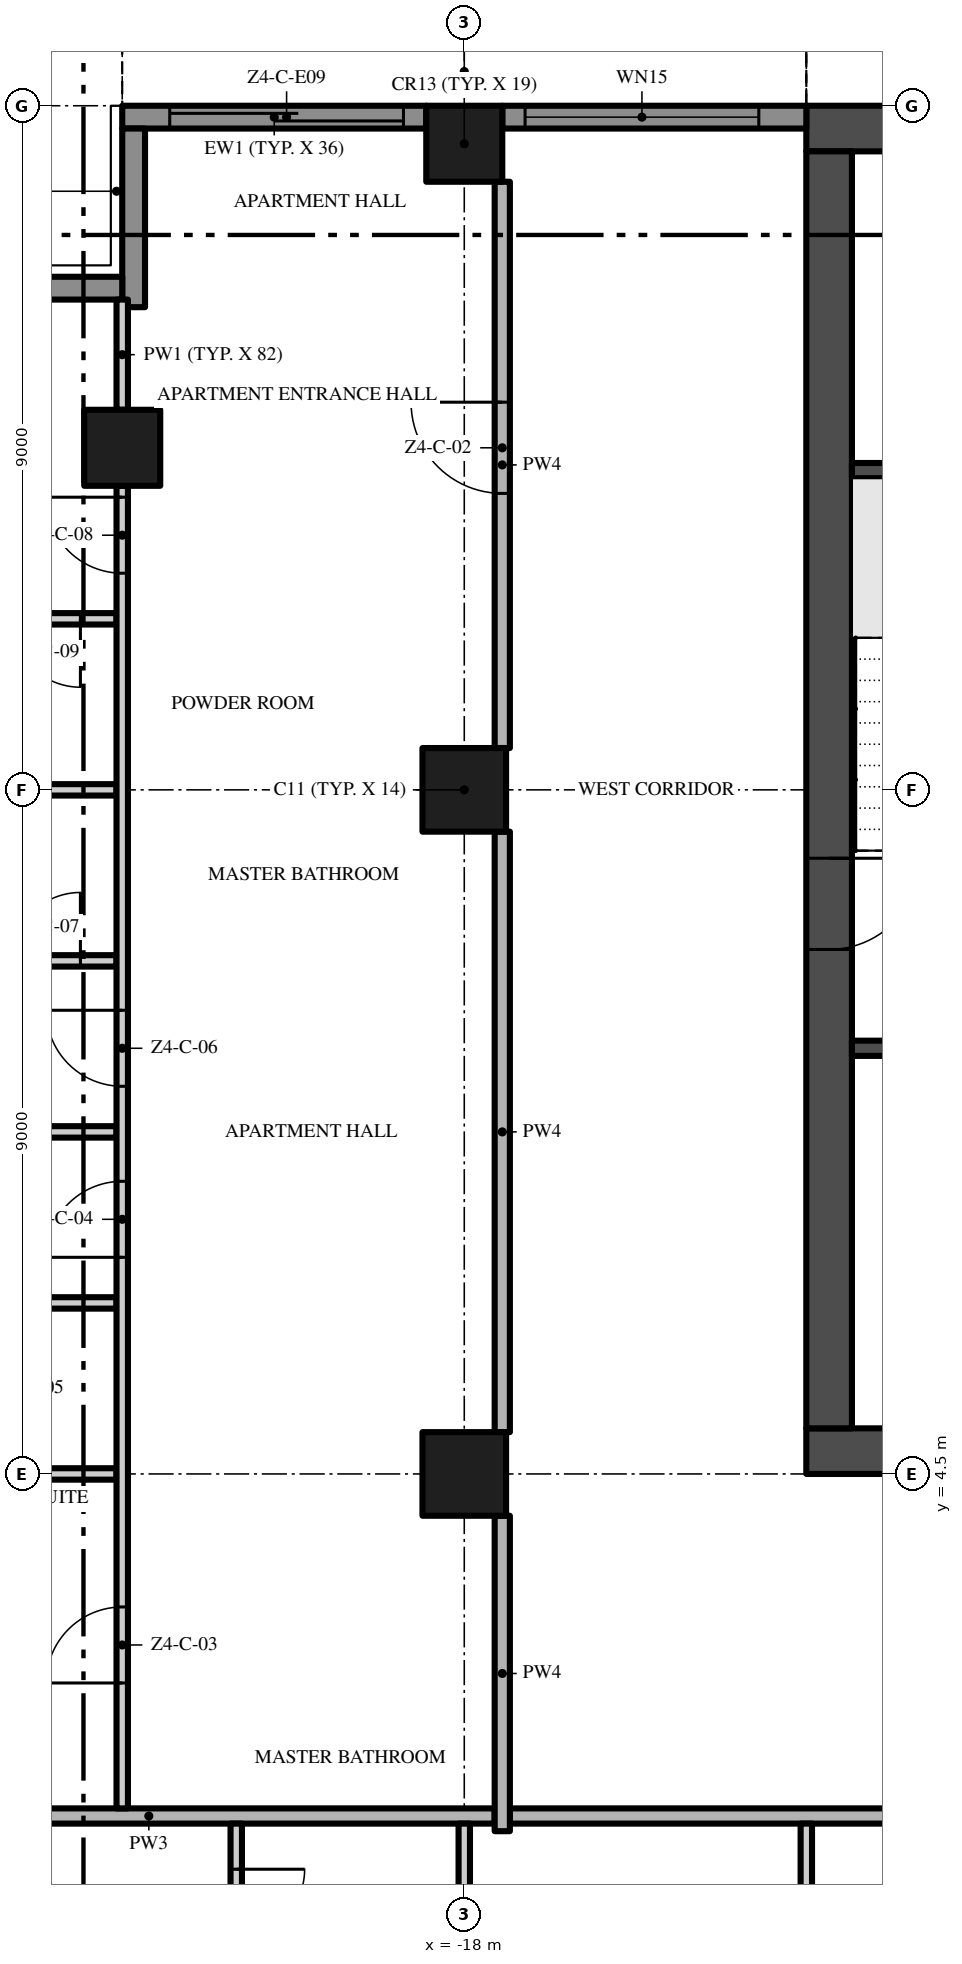
"""IFC4 building model, lengths in metres.
Left out: names, types, materials, properties, quantities, classifications, styles, units other than length and angle.
Written with IfcOpenShell. Run it as: python <this file> out.ifc"""

import sys

from ifc_helpers import new_model, si_unit, direction, frame, frame_2d, origin, origin_2d, place, context, subcontext, project, spatial, rectangle, extrude, element, fill, save


model = new_model("IFC4")
c1 = context("Model", 3, precision=1e-05, world=origin(), true_north=direction((0.0, 1.0)))
c2 = subcontext(c1, "Body", "Model", "MODEL_VIEW")
j1 = project(units=[si_unit("LENGTHUNIT", "METRE"), si_unit("PLANEANGLEUNIT", "RADIAN")], contexts=[c1])
p1 = place(None, origin())
s1 = spatial("IfcSite", under=j1, at=p1, CompositionType="ELEMENT")
p2 = place(p1, origin())
s2 = spatial("IfcBuilding", under=s1, at=p2, CompositionType="ELEMENT")
p3 = place(p2, frame((0.0, 0.0, 207.2)))
s3 = spatial("IfcBuildingStorey", under=s2, at=p3, CompositionType="ELEMENT", Elevation=207.2)
p4 = place(p3, frame((-13.5, 4.8, -0.3), z_axis=(0.0, 0.0, 1.0), x_axis=(1.0, 0.0, 0.0)))
e1 = element("IfcWall", 1, at=p4, inside=s3, PredefinedType="SHEAR", context=c2, shape_type="SweptSolid", body=[
    extrude(rectangle(XDim=27.0, YDim=0.6, at=frame_2d((13.5, 0.0))), origin(), (0.0, 0.0, 1.0), 3.8),
])
p5 = place(p4, frame((12.0, 0.0, 0.3)))
e2 = element("IfcOpeningElement", 2, at=p5, cuts=e1, PredefinedType="OPENING", context=c2, shape_type="SweptSolid", body=[
    extrude(rectangle(XDim=3.0, YDim=2.4, at=frame_2d((1.5, 1.2))), frame((0.0, 0.31, 0.0), z_axis=(0.0, -1.0, 0.0), x_axis=(1.0, 0.0, 0.0)), (0.0, 0.0, 1.0), 0.62),
])
p6 = place(p4, frame((4.9, 0.0, 0.3)))
e3 = element("IfcOpeningElement", 3, at=p6, cuts=e1, PredefinedType="OPENING", context=c2, shape_type="SweptSolid", body=[
    extrude(rectangle(XDim=1.2, YDim=2.2, at=frame_2d((0.6, 1.1))), frame((0.0, 0.31, 0.0), z_axis=(0.0, -1.0, 0.0), x_axis=(1.0, 0.0, 0.0)), (0.0, 0.0, 1.0), 0.62),
])
p7 = place(p4, frame((20.75, 0.0, 0.3)))
e4 = element("IfcOpeningElement", 4, at=p7, cuts=e1, PredefinedType="OPENING", context=c2, shape_type="SweptSolid", body=[
    extrude(rectangle(XDim=1.5, YDim=2.2, at=frame_2d((0.75, 1.1))), frame((0.0, 0.31, 0.0), z_axis=(0.0, -1.0, 0.0), x_axis=(1.0, 0.0, 0.0)), (0.0, 0.0, 1.0), 0.62),
])
p8 = place(p4, frame((17.4, 0.0, 0.3)))
e5 = element("IfcOpeningElement", 5, at=p8, cuts=e1, PredefinedType="OPENING", context=c2, shape_type="SweptSolid", body=[
    extrude(rectangle(XDim=1.2, YDim=2.2, at=frame_2d((0.6, 1.1))), frame((0.0, 0.31, 0.0), z_axis=(0.0, -1.0, 0.0), x_axis=(1.0, 0.0, 0.0)), (0.0, 0.0, 1.0), 0.62),
])
p9 = place(p3, frame((13.5, 22.2, -0.3), z_axis=(0.0, 0.0, 1.0), x_axis=(-1.0, 0.0, 0.0)))
e6 = element("IfcWall", 6, at=p9, inside=s3, PredefinedType="SHEAR", context=c2, shape_type="SweptSolid", body=[
    extrude(rectangle(XDim=27.0, YDim=0.6, at=frame_2d((13.5, 0.0))), origin(), (0.0, 0.0, 1.0), 3.8),
])
p10 = place(p3, frame((-13.2, 21.9, -0.3), z_axis=(0.0, 0.0, 1.0), x_axis=(0.0, -1.0, 0.0)))
e7 = element("IfcWall", 7, at=p10, inside=s3, PredefinedType="SHEAR", context=c2, shape_type="SweptSolid", body=[
    extrude(rectangle(XDim=16.8, YDim=0.6, at=frame_2d((8.4, 0.0))), origin(), (0.0, 0.0, 1.0), 3.8),
])
p11 = place(p10, frame((9.3, 0.0, 0.3)))
e8 = element("IfcOpeningElement", 8, at=p11, cuts=e7, PredefinedType="OPENING", context=c2, shape_type="SweptSolid", body=[
    extrude(rectangle(XDim=1.2, YDim=2.2, at=frame_2d((0.6, 1.1))), frame((0.0, 0.31, 0.0), z_axis=(0.0, -1.0, 0.0), x_axis=(1.0, 0.0, 0.0)), (0.0, 0.0, 1.0), 0.62),
])
p12 = place(p3, frame((-18.0, 13.5, 0.0), z_axis=(0.0, 0.0, 1.0), x_axis=(1.0, 0.0, 0.0)))
e9 = element("IfcColumn", 9, at=p12, inside=s3, PredefinedType="COLUMN", context=c2, shape_type="SweptSolid", body=[
    extrude(rectangle(XDim=1.1, YDim=1.1, at=origin_2d()), origin(), (0.0, 0.0, 1.0), 3.5),
])
p13 = place(p3, frame((-18.0, 22.0, 0.0), z_axis=(0.0, 0.0, 1.0), x_axis=(1.0, 0.0, 0.0)))
e10 = element("IfcColumn", 10, at=p13, inside=s3, PredefinedType="COLUMN", context=c2, shape_type="SweptSolid", body=[
    extrude(rectangle(XDim=1.0, YDim=1.0, at=origin_2d()), origin(), (0.0, 0.0, 1.0), 3.5),
])
p14 = place(p3, frame((-18.0, 4.5, 0.0), z_axis=(0.0, 0.0, 1.0), x_axis=(1.0, 0.0, 0.0)))
e11 = element("IfcColumn", 11, at=p14, inside=s3, PredefinedType="COLUMN", context=c2, shape_type="SweptSolid", body=[
    extrude(rectangle(XDim=1.1, YDim=1.1, at=origin_2d()), origin(), (0.0, 0.0, 1.0), 3.5),
])
p15 = place(p3, frame((-22.5, 18.0, 0.0), z_axis=(0.0, 0.0, 1.0), x_axis=(1.0, 0.0, 0.0)))
e12 = element("IfcColumn", 12, at=p15, inside=s3, PredefinedType="COLUMN", context=c2, shape_type="SweptSolid", body=[
    extrude(rectangle(XDim=1.0, YDim=1.0, at=origin_2d()), origin(), (0.0, 0.0, 1.0), 3.5),
])
p16 = place(p3, frame((-17.5, 22.35, 0.0), z_axis=(0.0, 0.0, 1.0), x_axis=(1.0, 0.0, 0.0)))
e13 = element("IfcWall", 13, at=p16, inside=s3, PredefinedType="SOLIDWALL", context=c2, shape_type="SweptSolid", body=[
    extrude(rectangle(XDim=4.0, YDim=0.3, at=frame_2d((2.0, 0.0))), origin(), (0.0, 0.0, 1.0), 3.5),
])
p17 = place(p16, frame((0.3, 0.0, 0.45)))
e14 = element("IfcOpeningElement", 14, at=p17, cuts=e13, PredefinedType="OPENING", context=c2, shape_type="SweptSolid", body=[
    extrude(rectangle(XDim=3.075, YDim=2.65, at=frame_2d((1.538, 1.325))), frame((0.0, 0.16, 0.0), z_axis=(0.0, -1.0, 0.0), x_axis=(1.0, 0.0, 0.0)), (0.0, 0.0, 1.0), 0.32),
])
p18 = place(p3, frame((-22.5, 22.35, 0.0), z_axis=(0.0, 0.0, 1.0), x_axis=(1.0, 0.0, 0.0)))
e15 = element("IfcWall", 15, at=p18, inside=s3, PredefinedType="SOLIDWALL", context=c2, shape_type="SweptSolid", body=[
    extrude(rectangle(XDim=4.0, YDim=0.3, at=frame_2d((2.0, 0.0))), origin(), (0.0, 0.0, 1.0), 3.5),
])
p19 = place(p18, frame((0.625, 0.0, 0.0)))
e16 = element("IfcOpeningElement", 16, at=p19, cuts=e15, PredefinedType="OPENING", context=c2, shape_type="SweptSolid", body=[
    extrude(rectangle(XDim=3.075, YDim=2.4, at=frame_2d((1.538, 1.2))), frame((0.0, 0.16, 0.0), z_axis=(0.0, -1.0, 0.0), x_axis=(1.0, 0.0, 0.0)), (0.0, 0.0, 1.0), 0.32),
])
p20 = place(p3, frame((-22.35, 19.85, 0.0), z_axis=(0.0, 0.0, 1.0), x_axis=(0.0, 1.0, 0.0)))
e17 = element("IfcWall", 17, at=p20, inside=s3, PredefinedType="SOLIDWALL", context=c2, shape_type="SweptSolid", body=[
    extrude(rectangle(XDim=2.35, YDim=0.3, at=frame_2d((1.175, 0.0))), origin(), (0.0, 0.0, 1.0), 3.5),
])
p21 = place(p3, frame((-24.75, 20.1, 0.0), z_axis=(0.0, 0.0, 1.0), x_axis=(1.0, 0.0, 0.0)))
e18 = element("IfcWall", 18, at=p21, inside=s3, PredefinedType="SOLIDWALL", context=c2, shape_type="SweptSolid", body=[
    extrude(rectangle(XDim=2.25, YDim=0.3, at=frame_2d((1.125, 0.0))), origin(), (0.0, 0.0, 1.0), 3.5),
])
for number, where, z_axis, x_axis in (
    (19, (-12.9, 10.1, 0.0), (0.0, 0.0, 1.0), (1.0, 0.0, 0.0)),
    (20, (-12.9, 17.7, 0.0), (0.0, 0.0, 1.0), (1.0, 0.0, 0.0)),
):
    element("IfcWall", number, at=place(p3, frame(where, z_axis=z_axis, x_axis=x_axis)), inside=s3, PredefinedType="SHEAR", context=c2, shape_type="SweptSolid", body=[
        extrude(rectangle(XDim=3.25, YDim=0.2, at=frame_2d((1.625, 0.0))), origin(), (0.0, 0.0, 1.0), 3.5),
    ])
p22 = place(p3, frame((-17.4, 0.0, 0.0), z_axis=(0.0, 0.0, 1.0), x_axis=(1.0, 0.0, 0.0)))
e21 = element("IfcWall", 21, at=p22, inside=s3, PredefinedType="PARTITIONING", context=c2, shape_type="SweptSolid", body=[
    extrude(rectangle(XDim=12.8, YDim=0.2, at=frame_2d((6.4, 0.0))), origin(), (0.0, 0.0, 1.0), 3.5),
])
p23 = place(p3, frame((-26.7, 0.0, 0.0), z_axis=(0.0, 0.0, 1.0), x_axis=(1.0, 0.0, 0.0)))
e22 = element("IfcWall", 22, at=p23, inside=s3, PredefinedType="PARTITIONING", context=c2, shape_type="SweptSolid", body=[
    extrude(rectangle(XDim=9.1, YDim=0.2, at=frame_2d((4.55, 0.0))), origin(), (0.0, 0.0, 1.0), 3.5),
])
p24 = place(p3, frame((-26.0, 4.5, 0.0), z_axis=(0.0, 0.0, 1.0), x_axis=(1.0, 0.0, 0.0)))
e23 = element("IfcWall", 23, at=p24, inside=s3, PredefinedType="PARTITIONING", context=c2, shape_type="SweptSolid", body=[
    extrude(rectangle(XDim=3.425, YDim=0.15, at=frame_2d((1.712, 0.0))), origin(), (0.0, 0.0, 1.0), 3.5),
])
p25 = place(p3, frame((-24.45, 6.75, 0.0), z_axis=(0.0, 0.0, 1.0), x_axis=(1.0, 0.0, 0.0)))
e24 = element("IfcWall", 24, at=p25, inside=s3, PredefinedType="PARTITIONING", context=c2, shape_type="SweptSolid", body=[
    extrude(rectangle(XDim=1.875, YDim=0.15, at=frame_2d((0.938, 0.0))), origin(), (0.0, 0.0, 1.0), 3.5),
])
p26 = place(p3, frame((-26.7, 9.0, 0.0), z_axis=(0.0, 0.0, 1.0), x_axis=(1.0, 0.0, 0.0)))
e25 = element("IfcWall", 25, at=p26, inside=s3, PredefinedType="PARTITIONING", context=c2, shape_type="SweptSolid", body=[
    extrude(rectangle(XDim=4.125, YDim=0.15, at=frame_2d((2.062, 0.0))), origin(), (0.0, 0.0, 1.0), 3.5),
])
p27 = place(p3, frame((-24.45, 11.25, 0.0), z_axis=(0.0, 0.0, 1.0), x_axis=(1.0, 0.0, 0.0)))
e26 = element("IfcWall", 26, at=p27, inside=s3, PredefinedType="PARTITIONING", context=c2, shape_type="SweptSolid", body=[
    extrude(rectangle(XDim=1.875, YDim=0.15, at=frame_2d((0.938, 0.0))), origin(), (0.0, 0.0, 1.0), 3.5),
])
p28 = place(p27, frame((0.5, 0.0, 0.0)))
e27 = element("IfcOpeningElement", 27, at=p28, cuts=e26, PredefinedType="OPENING", context=c2, shape_type="SweptSolid", body=[
    extrude(rectangle(XDim=0.9, YDim=2.1, at=frame_2d((0.45, 1.05))), frame((0.0, 0.085, 0.0), z_axis=(0.0, -1.0, 0.0), x_axis=(1.0, 0.0, 0.0)), (0.0, 0.0, 1.0), 0.17),
])
p29 = place(p3, frame((-24.45, 13.5, 0.0), z_axis=(0.0, 0.0, 1.0), x_axis=(1.0, 0.0, 0.0)))
e28 = element("IfcWall", 28, at=p29, inside=s3, PredefinedType="PARTITIONING", context=c2, shape_type="SweptSolid", body=[
    extrude(rectangle(XDim=1.875, YDim=0.15, at=frame_2d((0.938, 0.0))), origin(), (0.0, 0.0, 1.0), 3.5),
])
p30 = place(p3, frame((-22.575, 15.75, 0.0), z_axis=(0.0, 0.0, 1.0), x_axis=(-1.0, 0.0, 0.0)))
e29 = element("IfcWall", 29, at=p30, inside=s3, PredefinedType="PARTITIONING", context=c2, shape_type="SweptSolid", body=[
    extrude(rectangle(XDim=1.875, YDim=0.15, at=frame_2d((0.938, 0.0))), origin(), (0.0, 0.0, 1.0), 3.5),
])
p31 = place(p30, frame((0.475, 0.0, 0.0)))
e30 = element("IfcOpeningElement", 30, at=p31, cuts=e29, PredefinedType="OPENING", context=c2, shape_type="SweptSolid", body=[
    extrude(rectangle(XDim=0.9, YDim=2.1, at=frame_2d((0.45, 1.05))), frame((0.0, 0.085, 0.0), z_axis=(0.0, -1.0, 0.0), x_axis=(1.0, 0.0, 0.0)), (0.0, 0.0, 1.0), 0.17),
])
p32 = place(p3, frame((-22.5, 0.1, 0.0), z_axis=(0.0, 0.0, 1.0), x_axis=(0.0, 1.0, 0.0)))
e31 = element("IfcWall", 31, at=p32, inside=s3, PredefinedType="PARTITIONING", context=c2, shape_type="SweptSolid", body=[
    extrude(rectangle(XDim=17.4, YDim=0.15, at=frame_2d((8.7, 0.0))), origin(), (0.0, 0.0, 1.0), 3.5),
])
p33 = place(p32, frame((1.65, 0.0, 0.0)))
e32 = element("IfcOpeningElement", 32, at=p33, cuts=e31, PredefinedType="OPENING", context=c2, shape_type="SweptSolid", body=[
    extrude(rectangle(XDim=1.0, YDim=2.4, at=frame_2d((0.5, 1.2))), frame((0.0, 0.085, 0.0), z_axis=(0.0, -1.0, 0.0), x_axis=(1.0, 0.0, 0.0)), (0.0, 0.0, 1.0), 0.17),
])
p34 = place(p32, frame((7.25, 0.0, 0.0)))
e33 = element("IfcOpeningElement", 33, at=p34, cuts=e31, PredefinedType="OPENING", context=c2, shape_type="SweptSolid", body=[
    extrude(rectangle(XDim=1.0, YDim=2.4, at=frame_2d((0.5, 1.2))), frame((0.0, 0.085, 0.0), z_axis=(0.0, -1.0, 0.0), x_axis=(1.0, 0.0, 0.0)), (0.0, 0.0, 1.0), 0.17),
])
p35 = place(p32, frame((9.5, 0.0, 0.0)))
e34 = element("IfcOpeningElement", 34, at=p35, cuts=e31, PredefinedType="OPENING", context=c2, shape_type="SweptSolid", body=[
    extrude(rectangle(XDim=1.0, YDim=2.4, at=frame_2d((0.5, 1.2))), frame((0.0, 0.085, 0.0), z_axis=(0.0, -1.0, 0.0), x_axis=(1.0, 0.0, 0.0)), (0.0, 0.0, 1.0), 0.17),
])
p36 = place(p32, frame((16.25, 0.0, 0.0)))
e35 = element("IfcOpeningElement", 35, at=p36, cuts=e31, PredefinedType="OPENING", context=c2, shape_type="SweptSolid", body=[
    extrude(rectangle(XDim=1.0, YDim=2.4, at=frame_2d((0.5, 1.2))), frame((0.0, 0.085, 0.0), z_axis=(0.0, -1.0, 0.0), x_axis=(1.0, 0.0, 0.0)), (0.0, 0.0, 1.0), 0.17),
])
p37 = place(p3, frame((-22.5, 18.5, 0.0), z_axis=(0.0, 0.0, 1.0), x_axis=(0.0, 1.0, 0.0)))
e36 = element("IfcWall", 36, at=p37, inside=s3, PredefinedType="PARTITIONING", context=c2, shape_type="SweptSolid", body=[
    extrude(rectangle(XDim=1.45, YDim=0.15, at=frame_2d((0.725, 0.0))), origin(), (0.0, 0.0, 1.0), 3.5),
])
p38 = place(p3, frame((-21.0, -0.1, 0.0), z_axis=(0.0, 0.0, 1.0), x_axis=(0.0, -1.0, 0.0)))
e37 = element("IfcWall", 37, at=p38, inside=s3, PredefinedType="PARTITIONING", context=c2, shape_type="SweptSolid", body=[
    extrude(rectangle(XDim=2.225, YDim=0.15, at=frame_2d((1.113, 0.0))), origin(), (0.0, 0.0, 1.0), 3.5),
])
p39 = place(p38, frame((0.6, 0.0, 0.0)))
e38 = element("IfcOpeningElement", 38, at=p39, cuts=e37, PredefinedType="OPENING", context=c2, shape_type="SweptSolid", body=[
    extrude(rectangle(XDim=0.9, YDim=2.1, at=frame_2d((0.45, 1.05))), frame((0.0, 0.085, 0.0), z_axis=(0.0, -1.0, 0.0), x_axis=(1.0, 0.0, 0.0)), (0.0, 0.0, 1.0), 0.17),
])
p40 = place(p3, frame((-18.0, -3.95, 0.0), z_axis=(0.0, 0.0, 1.0), x_axis=(0.0, 1.0, 0.0)))
e39 = element("IfcWall", 39, at=p40, inside=s3, PredefinedType="PARTITIONING", context=c2, shape_type="SweptSolid", body=[
    extrude(rectangle(XDim=3.85, YDim=0.15, at=frame_2d((1.925, 0.0))), origin(), (0.0, 0.0, 1.0), 3.5),
])
p41 = place(p40, frame((0.15, 0.0, 0.0)))
e40 = element("IfcOpeningElement", 40, at=p41, cuts=e39, PredefinedType="OPENING", context=c2, shape_type="SweptSolid", body=[
    extrude(rectangle(XDim=1.0, YDim=2.4, at=frame_2d((0.5, 1.2))), frame((0.0, 0.085, 0.0), z_axis=(0.0, -1.0, 0.0), x_axis=(1.0, 0.0, 0.0)), (0.0, 0.0, 1.0), 0.17),
])
p42 = place(p3, frame((-17.5, -0.2, 0.0), z_axis=(0.0, 0.0, 1.0), x_axis=(0.0, 1.0, 0.0)))
e41 = element("IfcWall", 41, at=p42, inside=s3, PredefinedType="PARTITIONING", context=c2, shape_type="SweptSolid", body=[
    extrude(rectangle(XDim=4.15, YDim=0.2, at=frame_2d((2.075, 0.0))), origin(), (0.0, 0.0, 1.0), 3.5),
])
p43 = place(p3, frame((-17.5, 5.05, 0.0), z_axis=(0.0, 0.0, 1.0), x_axis=(0.0, 1.0, 0.0)))
e42 = element("IfcWall", 42, at=p43, inside=s3, PredefinedType="PARTITIONING", context=c2, shape_type="SweptSolid", body=[
    extrude(rectangle(XDim=7.9, YDim=0.2, at=frame_2d((3.95, 0.0))), origin(), (0.0, 0.0, 1.0), 3.5),
])
p44 = place(p3, frame((-17.5, 14.05, 0.0), z_axis=(0.0, 0.0, 1.0), x_axis=(0.0, 1.0, 0.0)))
e43 = element("IfcWall", 43, at=p44, inside=s3, PredefinedType="PARTITIONING", context=c2, shape_type="SweptSolid", body=[
    extrude(rectangle(XDim=7.45, YDim=0.2, at=frame_2d((3.725, 0.0))), origin(), (0.0, 0.0, 1.0), 3.5),
])
p45 = place(p44, frame((3.35, 0.0, 0.0)))
e44 = element("IfcOpeningElement", 44, at=p45, cuts=e43, PredefinedType="OPENING", context=c2, shape_type="SweptSolid", body=[
    extrude(rectangle(XDim=1.2, YDim=2.4, at=frame_2d((0.6, 1.2))), frame((0.0, 0.11, 0.0), z_axis=(0.0, -1.0, 0.0), x_axis=(1.0, 0.0, 0.0)), (0.0, 0.0, 1.0), 0.22),
])
p46 = place(p3, frame((-13.5, -8.325, 0.0), z_axis=(0.0, 0.0, 1.0), x_axis=(0.0, 1.0, 0.0)))
e45 = element("IfcWall", 45, at=p46, inside=s3, PredefinedType="PARTITIONING", context=c2, shape_type="SweptSolid", body=[
    extrude(rectangle(XDim=8.225, YDim=0.15, at=frame_2d((4.112, 0.0))), origin(), (0.0, 0.0, 1.0), 3.5),
])
p47 = place(p17, origin())
e46 = element("IfcWindow", 46, at=p47, inside=s3, PartitioningType="SINGLE_PANEL", PredefinedType="WINDOW", context=c2, shape_type="SweptSolid", body=[
    extrude(rectangle(XDim=3.075, YDim=2.65, at=frame_2d((1.538, 1.325))), frame((0.0, 0.03, 0.0), z_axis=(0.0, -1.0, 0.0), x_axis=(1.0, 0.0, 0.0)), (0.0, 0.0, 1.0), 0.06),
])
fill(e14, e46)
p48 = place(p19, origin())
e47 = element("IfcDoor", 47, at=p48, inside=s3, OperationType="SINGLE_SWING_LEFT", PredefinedType="DOOR", context=c2, shape_type="SweptSolid", body=[
    extrude(rectangle(XDim=3.075, YDim=2.4, at=frame_2d((1.538, 1.2))), frame((0.0, 0.025, 0.0), z_axis=(0.0, -1.0, 0.0), x_axis=(1.0, 0.0, 0.0)), (0.0, 0.0, 1.0), 0.05),
])
fill(e16, e47)
p49 = place(p11, frame((1.2, 0.0, 0.0), z_axis=(0.0, 0.0, 1.0), x_axis=(-1.0, 0.0, 0.0)))
e48 = element("IfcDoor", 48, at=p49, inside=s3, OperationType="SINGLE_SWING_RIGHT", PredefinedType="DOOR", context=c2, shape_type="SweptSolid", body=[
    extrude(rectangle(XDim=1.2, YDim=2.2, at=frame_2d((0.6, 1.1))), frame((0.0, 0.025, 0.0), z_axis=(0.0, -1.0, 0.0), x_axis=(1.0, 0.0, 0.0)), (0.0, 0.0, 1.0), 0.05),
])
fill(e8, e48)
p50 = place(p45, origin())
e49 = element("IfcDoor", 49, at=p50, inside=s3, OperationType="SINGLE_SWING_RIGHT", PredefinedType="DOOR", context=c2, shape_type="SweptSolid", body=[
    extrude(rectangle(XDim=1.2, YDim=2.4, at=frame_2d((0.6, 1.2))), frame((0.0, 0.025, 0.0), z_axis=(0.0, -1.0, 0.0), x_axis=(1.0, 0.0, 0.0)), (0.0, 0.0, 1.0), 0.05),
])
fill(e44, e49)
p51 = place(p33, origin())
e50 = element("IfcDoor", 50, at=p51, inside=s3, OperationType="SINGLE_SWING_LEFT", PredefinedType="DOOR", context=c2, shape_type="SweptSolid", body=[
    extrude(rectangle(XDim=1.0, YDim=2.4, at=frame_2d((0.5, 1.2))), frame((0.0, 0.025, 0.0), z_axis=(0.0, -1.0, 0.0), x_axis=(1.0, 0.0, 0.0)), (0.0, 0.0, 1.0), 0.05),
])
fill(e32, e50)
p52 = place(p34, origin())
e51 = element("IfcDoor", 51, at=p52, inside=s3, OperationType="SINGLE_SWING_LEFT", PredefinedType="DOOR", context=c2, shape_type="SweptSolid", body=[
    extrude(rectangle(XDim=1.0, YDim=2.4, at=frame_2d((0.5, 1.2))), frame((0.0, 0.025, 0.0), z_axis=(0.0, -1.0, 0.0), x_axis=(1.0, 0.0, 0.0)), (0.0, 0.0, 1.0), 0.05),
])
fill(e33, e51)
p53 = place(p35, origin())
e52 = element("IfcDoor", 52, at=p53, inside=s3, OperationType="SINGLE_SWING_RIGHT", PredefinedType="DOOR", context=c2, shape_type="SweptSolid", body=[
    extrude(rectangle(XDim=1.0, YDim=2.4, at=frame_2d((0.5, 1.2))), frame((0.0, 0.025, 0.0), z_axis=(0.0, -1.0, 0.0), x_axis=(1.0, 0.0, 0.0)), (0.0, 0.0, 1.0), 0.05),
])
fill(e34, e52)
p54 = place(p28, origin())
e53 = element("IfcDoor", 53, at=p54, inside=s3, OperationType="SINGLE_SWING_RIGHT", PredefinedType="DOOR", context=c2, shape_type="SweptSolid", body=[
    extrude(rectangle(XDim=0.9, YDim=2.1, at=frame_2d((0.45, 1.05))), frame((0.0, 0.025, 0.0), z_axis=(0.0, -1.0, 0.0), x_axis=(1.0, 0.0, 0.0)), (0.0, 0.0, 1.0), 0.05),
])
fill(e27, e53)
p55 = place(p36, origin())
e54 = element("IfcDoor", 54, at=p55, inside=s3, OperationType="SINGLE_SWING_RIGHT", PredefinedType="DOOR", context=c2, shape_type="SweptSolid", body=[
    extrude(rectangle(XDim=1.0, YDim=2.4, at=frame_2d((0.5, 1.2))), frame((0.0, 0.025, 0.0), z_axis=(0.0, -1.0, 0.0), x_axis=(1.0, 0.0, 0.0)), (0.0, 0.0, 1.0), 0.05),
])
fill(e35, e54)
p56 = place(p31, origin())
e55 = element("IfcDoor", 55, at=p56, inside=s3, OperationType="SINGLE_SWING_LEFT", PredefinedType="DOOR", context=c2, shape_type="SweptSolid", body=[
    extrude(rectangle(XDim=0.9, YDim=2.1, at=frame_2d((0.45, 1.05))), frame((0.0, 0.025, 0.0), z_axis=(0.0, -1.0, 0.0), x_axis=(1.0, 0.0, 0.0)), (0.0, 0.0, 1.0), 0.05),
])
fill(e30, e55)
p57 = place(p39, origin())
e56 = element("IfcDoor", 56, at=p57, inside=s3, OperationType="SINGLE_SWING_LEFT", PredefinedType="DOOR", context=c2, shape_type="SweptSolid", body=[
    extrude(rectangle(XDim=0.9, YDim=2.1, at=frame_2d((0.45, 1.05))), frame((0.0, 0.025, 0.0), z_axis=(0.0, -1.0, 0.0), x_axis=(1.0, 0.0, 0.0)), (0.0, 0.0, 1.0), 0.05),
])
fill(e38, e56)
save(model, sys.argv[1])
